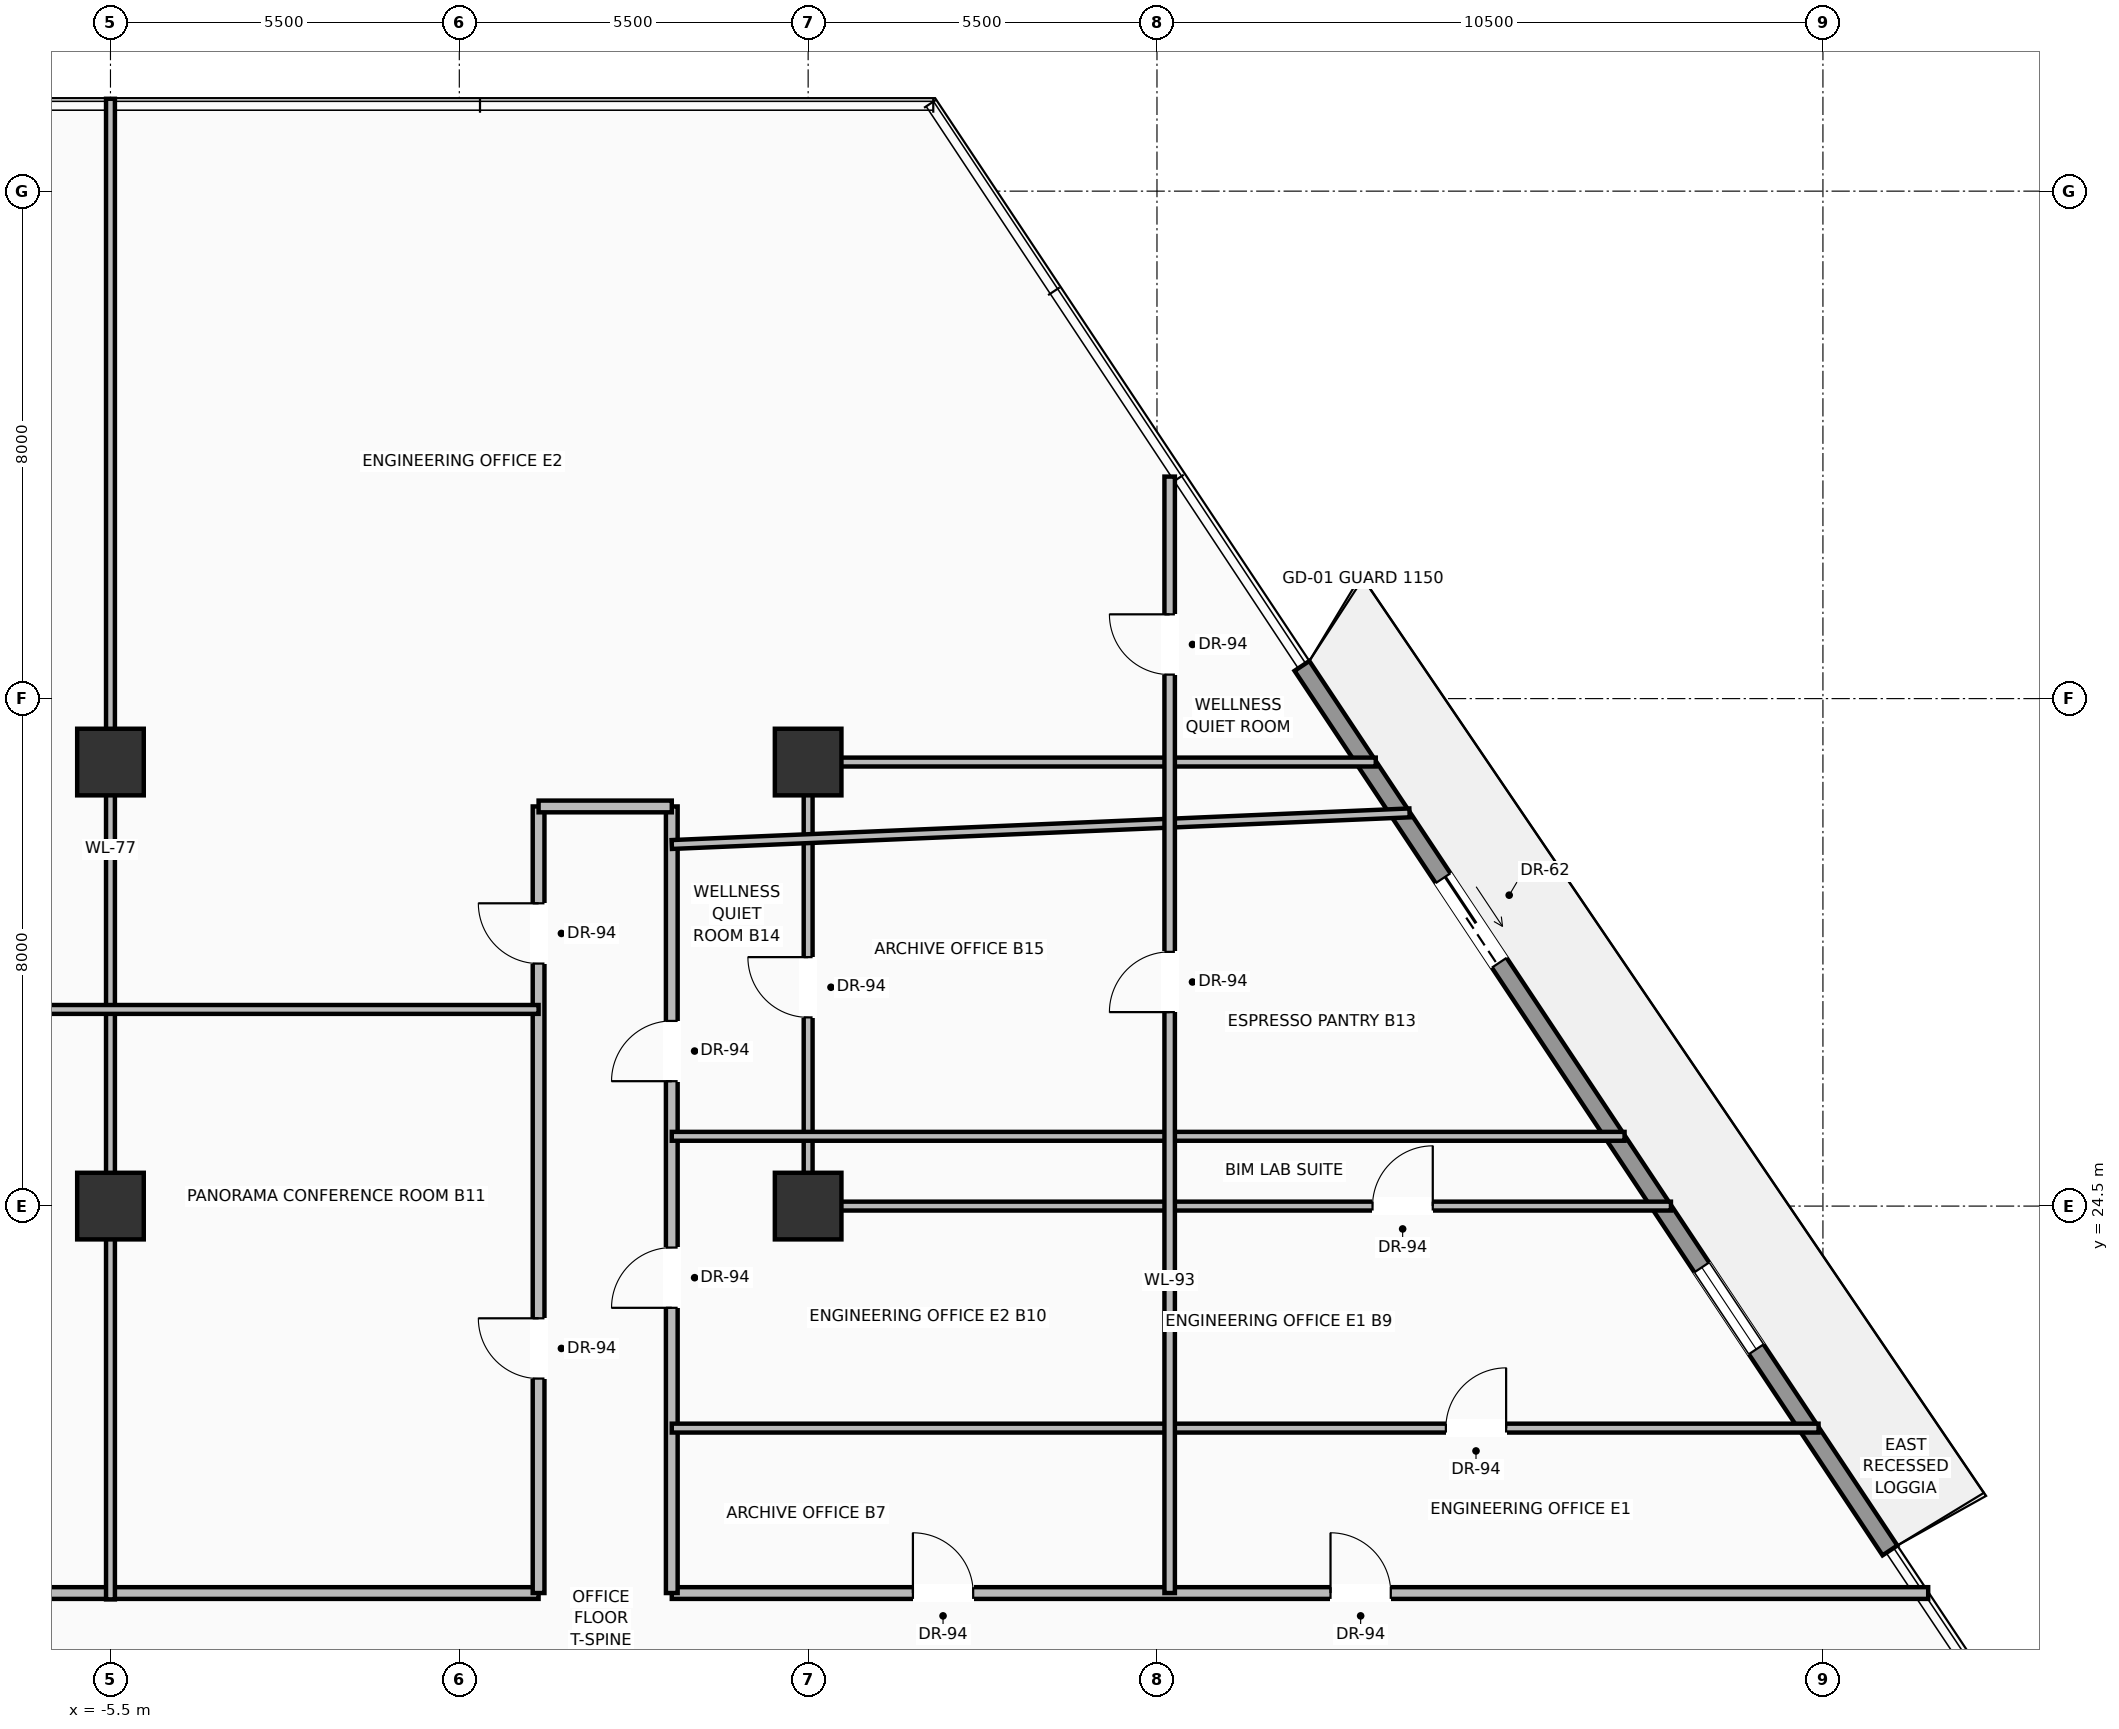
"""IFC4 building model, lengths in metres.
Left out: names, types, materials, properties, quantities, classifications, styles, units other than length and angle.
Written with IfcOpenShell. Run it as: python <this file> out.ifc"""

import sys

from ifc_helpers import new_model, si_unit, direction, frame, frame_2d, origin, origin_2d, place, context, subcontext, project, spatial, rectangle, extrude, source, transform, mapped, element, fill, save


model = new_model("IFC4")
c1 = context("Model", 3, precision=1e-05, world=origin(), true_north=direction((0.0, 1.0)))
c2 = subcontext(c1, "Body", "Model", "MODEL_VIEW")
j1 = project(units=[si_unit("LENGTHUNIT", "METRE"), si_unit("PLANEANGLEUNIT", "RADIAN")], contexts=[c1])
p1 = place(None, origin())
s1 = spatial("IfcSite", under=j1, at=p1, CompositionType="ELEMENT")
p2 = place(p1, origin())
s2 = spatial("IfcBuilding", under=s1, at=p2, CompositionType="ELEMENT")
p3 = place(p2, frame((0.0, 0.0, 57.1)))
s3 = spatial("IfcBuildingStorey", under=s2, at=p3, CompositionType="ELEMENT", Elevation=57.1)
m1 = source(origin(), c2, "Body", "SweptSolid", [
    extrude(rectangle(XDim=1.05, YDim=1.05, at=origin_2d()), origin(), (0.0, 0.0, 1.0), 3.7),
])
for number, where, z_axis, x_axis in (
    (1, (-5.5, 24.5, 0.0), (0.0, 0.0, 1.0), (1.0, 0.0, 0.0)),
    (2, (5.5, 24.5, 0.0), (0.0, 0.0, 1.0), (1.0, 0.0, 0.0)),
    (3, (-5.5, 31.5, 0.0), (0.0, 0.0, 1.0), (1.0, 0.0, 0.0)),
    (4, (5.5, 31.5, 0.0), (0.0, 0.0, 1.0), (1.0, 0.0, 0.0)),
):
    element("IfcColumn", number, at=place(p3, frame(where, z_axis=z_axis, x_axis=x_axis)), inside=s3, PredefinedType="COLUMN", context=c2, shape_type="MappedRepresentation", body=[
        mapped(m1, transform((0.0, 0.0, 0.0), scale=1.0)),
    ])
p4 = place(p3, frame((13.286, 33.015, 0.0), z_axis=(0.0, 0.0, 1.0), x_axis=(0.553666793668, -0.832738303183, 0.0)))
e5 = element("IfcWall", 5, at=p4, inside=s3, PredefinedType="SOLIDWALL", context=c2, shape_type="SweptSolid", body=[
    extrude(rectangle(XDim=16.744, YDim=0.28, at=frame_2d((8.372, 0.0))), origin(), (0.0, 0.0, 1.0), 3.03),
])
p5 = place(p4, frame((4.019, 0.0, 0.0)))
e6 = element("IfcOpeningElement", 6, at=p5, cuts=e5, PredefinedType="OPENING", context=c2, shape_type="SweptSolid", body=[
    extrude(rectangle(XDim=1.6, YDim=2.35, at=frame_2d((0.8, 1.175))), frame((0.0, 0.15, 0.0), z_axis=(0.0, -1.0, 0.0), x_axis=(1.0, 0.0, 0.0)), (0.0, 0.0, 1.0), 0.3),
])
p6 = place(p4, frame((11.386, 0.0, 0.9)))
e7 = element("IfcOpeningElement", 7, at=p6, cuts=e5, PredefinedType="OPENING", context=c2, shape_type="SweptSolid", body=[
    extrude(rectangle(XDim=1.55, YDim=1.85, at=frame_2d((0.775, 0.925))), frame((0.0, 0.15, 0.0), z_axis=(0.0, -1.0, 0.0), x_axis=(1.0, 0.0, 0.0)), (0.0, 0.0, 1.0), 0.3),
])
p7 = place(p3, frame((-22.873, 18.4, 0.0), z_axis=(0.0, 0.0, 1.0), x_axis=(1.0, 0.0, 0.0)))
e8 = element("IfcWall", 8, at=p7, inside=s3, PredefinedType="PARTITIONING", context=c2, shape_type="SweptSolid", body=[
    extrude(rectangle(XDim=24.123, YDim=0.185, at=frame_2d((12.062, 0.0))), origin(), (0.0, 0.0, 1.0), 2.747),
])
p8 = place(p7, frame((10.415, 0.0, 0.0)))
e9 = element("IfcOpeningElement", 9, at=p8, cuts=e8, PredefinedType="OPENING", context=c2, shape_type="SweptSolid", body=[
    extrude(rectangle(XDim=0.95, YDim=2.2, at=frame_2d((0.475, 1.1))), frame((0.0, 0.103, 0.0), z_axis=(0.0, -1.0, 0.0), x_axis=(1.0, 0.0, 0.0)), (0.0, 0.0, 1.0), 0.205),
])
p9 = place(p3, frame((3.35, 18.4, 0.0), z_axis=(0.0, 0.0, 1.0), x_axis=(1.0, 0.0, 0.0)))
e10 = element("IfcWall", 10, at=p9, inside=s3, PredefinedType="PARTITIONING", context=c2, shape_type="SweptSolid", body=[
    extrude(rectangle(XDim=19.809, YDim=0.185, at=frame_2d((9.905, 0.0))), origin(), (0.0, 0.0, 1.0), 2.747),
])
p10 = place(p9, frame((10.386, 0.0, 0.0)))
e11 = element("IfcOpeningElement", 11, at=p10, cuts=e10, PredefinedType="OPENING", context=c2, shape_type="SweptSolid", body=[
    extrude(rectangle(XDim=0.95, YDim=2.2, at=frame_2d((0.475, 1.1))), frame((0.0, 0.103, 0.0), z_axis=(0.0, -1.0, 0.0), x_axis=(1.0, 0.0, 0.0)), (0.0, 0.0, 1.0), 0.205),
])
p11 = place(p9, frame((3.802, 0.0, 0.0)))
e12 = element("IfcOpeningElement", 12, at=p11, cuts=e10, PredefinedType="OPENING", context=c2, shape_type="SweptSolid", body=[
    extrude(rectangle(XDim=0.95, YDim=2.2, at=frame_2d((0.475, 1.1))), frame((0.0, 0.103, 0.0), z_axis=(0.0, -1.0, 0.0), x_axis=(1.0, 0.0, 0.0)), (0.0, 0.0, 1.0), 0.205),
])
p12 = place(p3, frame((1.25, 18.4, 0.0), z_axis=(0.0, 0.0, 1.0), x_axis=(0.0, 1.0, 0.0)))
e13 = element("IfcWall", 13, at=p12, inside=s3, PredefinedType="PARTITIONING", context=c2, shape_type="SweptSolid", body=[
    extrude(rectangle(XDim=12.4, YDim=0.185, at=frame_2d((6.2, 0.0))), origin(), (0.0, 0.0, 1.0), 2.747),
])
p13 = place(p12, frame((3.381, 0.0, 0.0)))
e14 = element("IfcOpeningElement", 14, at=p13, cuts=e13, PredefinedType="OPENING", context=c2, shape_type="SweptSolid", body=[
    extrude(rectangle(XDim=0.95, YDim=2.2, at=frame_2d((0.475, 1.1))), frame((0.0, 0.103, 0.0), z_axis=(0.0, -1.0, 0.0), x_axis=(1.0, 0.0, 0.0)), (0.0, 0.0, 1.0), 0.205),
])
p14 = place(p12, frame((9.923, 0.0, 0.0)))
e15 = element("IfcOpeningElement", 15, at=p14, cuts=e13, PredefinedType="OPENING", context=c2, shape_type="SweptSolid", body=[
    extrude(rectangle(XDim=0.95, YDim=2.2, at=frame_2d((0.475, 1.1))), frame((0.0, 0.103, 0.0), z_axis=(0.0, -1.0, 0.0), x_axis=(1.0, 0.0, 0.0)), (0.0, 0.0, 1.0), 0.205),
])
p15 = place(p3, frame((3.35, 18.4, 0.0), z_axis=(0.0, 0.0, 1.0), x_axis=(0.0, 1.0, 0.0)))
e16 = element("IfcWall", 16, at=p15, inside=s3, PredefinedType="PARTITIONING", context=c2, shape_type="SweptSolid", body=[
    extrude(rectangle(XDim=12.4, YDim=0.185, at=frame_2d((6.2, 0.0))), origin(), (0.0, 0.0, 1.0), 2.747),
])
p16 = place(p15, frame((8.069, 0.0, 0.0)))
e17 = element("IfcOpeningElement", 17, at=p16, cuts=e16, PredefinedType="OPENING", context=c2, shape_type="SweptSolid", body=[
    extrude(rectangle(XDim=0.95, YDim=2.2, at=frame_2d((0.475, 1.1))), frame((0.0, 0.103, 0.0), z_axis=(0.0, -1.0, 0.0), x_axis=(1.0, 0.0, 0.0)), (0.0, 0.0, 1.0), 0.205),
])
p17 = place(p15, frame((4.496, 0.0, 0.0)))
e18 = element("IfcOpeningElement", 18, at=p17, cuts=e16, PredefinedType="OPENING", context=c2, shape_type="SweptSolid", body=[
    extrude(rectangle(XDim=0.95, YDim=2.2, at=frame_2d((0.475, 1.1))), frame((0.0, 0.103, 0.0), z_axis=(0.0, -1.0, 0.0), x_axis=(1.0, 0.0, 0.0)), (0.0, 0.0, 1.0), 0.205),
])
p18 = place(p3, frame((1.25, 30.8, 0.0), z_axis=(0.0, 0.0, 1.0), x_axis=(1.0, 0.0, 0.0)))
e19 = element("IfcWall", 19, at=p18, inside=s3, PredefinedType="PARTITIONING", context=c2, shape_type="SweptSolid", body=[
    extrude(rectangle(XDim=2.1, YDim=0.185, at=frame_2d((1.05, 0.0))), origin(), (0.0, 0.0, 1.0), 3.442),
])
p19 = place(p3, frame((-5.5, 18.3, 0.0), z_axis=(0.0, 0.0, 1.0), x_axis=(0.0, 1.0, 0.0)))
e20 = element("IfcWall", 20, at=p19, inside=s3, PredefinedType="PARTITIONING", context=c2, shape_type="SweptSolid", body=[
    extrude(rectangle(XDim=23.656, YDim=0.14, at=frame_2d((11.828, 0.0))), origin(), (0.0, 0.0, 1.0), 2.747),
])
p20 = place(p3, frame((5.5, 24.5, 0.0), z_axis=(0.0, 0.0, 1.0), x_axis=(1.0, 0.0, 0.0)))
e21 = element("IfcWall", 21, at=p20, inside=s3, PredefinedType="PARTITIONING", context=c2, shape_type="SweptSolid", body=[
    extrude(rectangle(XDim=13.604, YDim=0.14, at=frame_2d((6.802, 0.0))), origin(), (0.0, 0.0, 1.0), 2.747),
])
p21 = place(p20, frame((8.898, 0.0, 0.0)))
e22 = element("IfcOpeningElement", 22, at=p21, cuts=e21, PredefinedType="OPENING", context=c2, shape_type="SweptSolid", body=[
    extrude(rectangle(XDim=0.95, YDim=2.2, at=frame_2d((0.475, 1.1))), frame((0.0, 0.08, 0.0), z_axis=(0.0, -1.0, 0.0), x_axis=(1.0, 0.0, 0.0)), (0.0, 0.0, 1.0), 0.16),
])
p22 = place(p3, frame((5.5, 24.5, 0.0), z_axis=(0.0, 0.0, 1.0), x_axis=(0.0, 1.0, 0.0)))
e23 = element("IfcWall", 23, at=p22, inside=s3, PredefinedType="PARTITIONING", context=c2, shape_type="SweptSolid", body=[
    extrude(rectangle(XDim=7.0, YDim=0.14, at=frame_2d((3.5, 0.0))), origin(), (0.0, 0.0, 1.0), 2.747),
])
p23 = place(p22, frame((2.975, 0.0, 0.0)))
e24 = element("IfcOpeningElement", 24, at=p23, cuts=e23, PredefinedType="OPENING", context=c2, shape_type="SweptSolid", body=[
    extrude(rectangle(XDim=0.95, YDim=2.2, at=frame_2d((0.475, 1.1))), frame((0.0, 0.08, 0.0), z_axis=(0.0, -1.0, 0.0), x_axis=(1.0, 0.0, 0.0)), (0.0, 0.0, 1.0), 0.16),
])
p24 = place(p3, frame((5.5, 31.5, 0.0), z_axis=(0.0, 0.0, 1.0), x_axis=(1.0, 0.0, 0.0)))
e25 = element("IfcWall", 25, at=p24, inside=s3, PredefinedType="PARTITIONING", context=c2, shape_type="SweptSolid", body=[
    extrude(rectangle(XDim=8.949, YDim=0.14, at=frame_2d((4.475, 0.0))), origin(), (0.0, 0.0, 1.0), 2.747),
])
p25 = place(p3, frame((-16.613, 27.6, 0.0), z_axis=(0.0, 0.0, 1.0), x_axis=(1.0, 0.0, 0.0)))
e26 = element("IfcWall", 26, at=p25, inside=s3, PredefinedType="PARTITIONING", context=c2, shape_type="SweptSolid", body=[
    extrude(rectangle(XDim=17.863, YDim=0.14, at=frame_2d((8.932, 0.0))), origin(), (0.0, 0.0, 1.0), 2.747),
])
p26 = place(p25, frame((5.355, 0.0, 0.0)))
e27 = element("IfcOpeningElement", 27, at=p26, cuts=e26, PredefinedType="OPENING", context=c2, shape_type="SweptSolid", body=[
    extrude(rectangle(XDim=0.95, YDim=2.2, at=frame_2d((0.475, 1.1))), frame((0.0, 0.08, 0.0), z_axis=(0.0, -1.0, 0.0), x_axis=(1.0, 0.0, 0.0)), (0.0, 0.0, 1.0), 0.16),
])
p27 = place(p3, frame((3.35, 21.0, 0.0), z_axis=(0.0, 0.0, 1.0), x_axis=(1.0, 0.0, 0.0)))
e28 = element("IfcWall", 28, at=p27, inside=s3, PredefinedType="PARTITIONING", context=c2, shape_type="SweptSolid", body=[
    extrude(rectangle(XDim=18.081, YDim=0.14, at=frame_2d((9.041, 0.0))), origin(), (0.0, 0.0, 1.0), 2.747),
])
p28 = place(p27, frame((12.205, 0.0, 0.0)))
e29 = element("IfcOpeningElement", 29, at=p28, cuts=e28, PredefinedType="OPENING", context=c2, shape_type="SweptSolid", body=[
    extrude(rectangle(XDim=0.95, YDim=2.2, at=frame_2d((0.475, 1.1))), frame((0.0, 0.08, 0.0), z_axis=(0.0, -1.0, 0.0), x_axis=(1.0, 0.0, 0.0)), (0.0, 0.0, 1.0), 0.16),
])
p29 = place(p3, frame((3.35, 25.6, 0.0), z_axis=(0.0, 0.0, 1.0), x_axis=(1.0, 0.0, 0.0)))
e30 = element("IfcWall", 30, at=p29, inside=s3, PredefinedType="PARTITIONING", context=c2, shape_type="SweptSolid", body=[
    extrude(rectangle(XDim=15.022, YDim=0.14, at=frame_2d((7.511, 0.0))), origin(), (0.0, 0.0, 1.0), 2.747),
])
p30 = place(p3, frame((3.35, 30.2, 0.0), z_axis=(0.0, 0.0, 1.0), x_axis=(0.999082870188, 0.042818436404, 0.0)))
e31 = element("IfcWall", 31, at=p30, inside=s3, PredefinedType="PARTITIONING", context=c2, shape_type="SweptSolid", body=[
    extrude(rectangle(XDim=11.643, YDim=0.14, at=frame_2d((5.822, 0.0))), origin(), (0.0, 0.0, 1.0), 2.747),
])
p31 = place(p3, frame((11.2, 18.4, 0.0), z_axis=(0.0, 0.0, 1.0), x_axis=(0.0, 1.0, 0.0)))
e32 = element("IfcWall", 32, at=p31, inside=s3, PredefinedType="PARTITIONING", context=c2, shape_type="SweptSolid", body=[
    extrude(rectangle(XDim=17.6, YDim=0.165, at=frame_2d((8.8, 0.0))), origin(), (0.0, 0.0, 1.0), 2.747),
])
p32 = place(p31, frame((9.158, 0.0, 0.0)))
e33 = element("IfcOpeningElement", 33, at=p32, cuts=e32, PredefinedType="OPENING", context=c2, shape_type="SweptSolid", body=[
    extrude(rectangle(XDim=0.95, YDim=2.2, at=frame_2d((0.475, 1.1))), frame((0.0, 0.093, 0.0), z_axis=(0.0, -1.0, 0.0), x_axis=(1.0, 0.0, 0.0)), (0.0, 0.0, 1.0), 0.185),
])
p33 = place(p31, frame((14.479, 0.0, 0.0)))
e34 = element("IfcOpeningElement", 34, at=p33, cuts=e32, PredefinedType="OPENING", context=c2, shape_type="SweptSolid", body=[
    extrude(rectangle(XDim=0.95, YDim=2.2, at=frame_2d((0.475, 1.1))), frame((0.0, 0.093, 0.0), z_axis=(0.0, -1.0, 0.0), x_axis=(1.0, 0.0, 0.0)), (0.0, 0.0, 1.0), 0.185),
])
m2 = source(origin(), c2, "Body", "SweptSolid", [
    extrude(rectangle(XDim=1.6, YDim=2.35, at=frame_2d((0.8, 1.175))), frame((0.0, 0.025, 0.0), z_axis=(0.0, -1.0, 0.0), x_axis=(1.0, 0.0, 0.0)), (0.0, 0.0, 1.0), 0.05),
])
p34 = place(p5, origin())
e35 = element("IfcDoor", 35, at=p34, inside=s3, OperationType="SLIDING_TO_RIGHT", PredefinedType="DOOR", context=c2, shape_type="MappedRepresentation", body=[
    mapped(m2, transform((0.0, 0.0, 0.0), scale=1.0)),
])
fill(e6, e35)
m3 = source(origin(), c2, "Body", "SweptSolid", [
    extrude(rectangle(XDim=1.55, YDim=1.85, at=frame_2d((0.775, 0.925))), frame((0.0, 0.03, 0.0), z_axis=(0.0, -1.0, 0.0), x_axis=(1.0, 0.0, 0.0)), (0.0, 0.0, 1.0), 0.06),
])
p35 = place(p6, origin())
e36 = element("IfcWindow", 36, at=p35, inside=s3, PartitioningType="SINGLE_PANEL", PredefinedType="WINDOW", context=c2, shape_type="MappedRepresentation", body=[
    mapped(m3, transform((0.0, 0.0, 0.0), scale=1.0)),
])
fill(e7, e36)
m4 = source(origin(), c2, "Body", "SweptSolid", [
    extrude(rectangle(XDim=0.95, YDim=2.2, at=frame_2d((0.475, 1.1))), frame((0.0, 0.025, 0.0), z_axis=(0.0, -1.0, 0.0), x_axis=(1.0, 0.0, 0.0)), (0.0, 0.0, 1.0), 0.05),
])
p36 = place(p10, origin())
e37 = element("IfcDoor", 37, at=p36, inside=s3, OperationType="SINGLE_SWING_LEFT", PredefinedType="DOOR", context=c2, shape_type="MappedRepresentation", body=[
    mapped(m4, transform((0.0, 0.0, 0.0), scale=1.0)),
])
fill(e11, e37)
p37 = place(p13, origin())
e38 = element("IfcDoor", 38, at=p37, inside=s3, OperationType="SINGLE_SWING_RIGHT", PredefinedType="DOOR", context=c2, shape_type="MappedRepresentation", body=[
    mapped(m4, transform((0.0, 0.0, 0.0), scale=1.0)),
])
fill(e14, e38)
p38 = place(p16, origin())
e39 = element("IfcDoor", 39, at=p38, inside=s3, OperationType="SINGLE_SWING_LEFT", PredefinedType="DOOR", context=c2, shape_type="MappedRepresentation", body=[
    mapped(m4, transform((0.0, 0.0, 0.0), scale=1.0)),
])
fill(e17, e39)
p39 = place(p11, origin())
e40 = element("IfcDoor", 40, at=p39, inside=s3, OperationType="SINGLE_SWING_LEFT", PredefinedType="DOOR", context=c2, shape_type="MappedRepresentation", body=[
    mapped(m4, transform((0.0, 0.0, 0.0), scale=1.0)),
])
fill(e12, e40)
p40 = place(p28, origin())
e41 = element("IfcDoor", 41, at=p40, inside=s3, OperationType="SINGLE_SWING_RIGHT", PredefinedType="DOOR", context=c2, shape_type="MappedRepresentation", body=[
    mapped(m4, transform((0.0, 0.0, 0.0), scale=1.0)),
])
fill(e29, e41)
p41 = place(p17, origin())
e42 = element("IfcDoor", 42, at=p41, inside=s3, OperationType="SINGLE_SWING_LEFT", PredefinedType="DOOR", context=c2, shape_type="MappedRepresentation", body=[
    mapped(m4, transform((0.0, 0.0, 0.0), scale=1.0)),
])
fill(e18, e42)
p42 = place(p23, origin())
e43 = element("IfcDoor", 43, at=p42, inside=s3, OperationType="SINGLE_SWING_RIGHT", PredefinedType="DOOR", context=c2, shape_type="MappedRepresentation", body=[
    mapped(m4, transform((0.0, 0.0, 0.0), scale=1.0)),
])
fill(e24, e43)
p43 = place(p14, origin())
e44 = element("IfcDoor", 44, at=p43, inside=s3, OperationType="SINGLE_SWING_RIGHT", PredefinedType="DOOR", context=c2, shape_type="MappedRepresentation", body=[
    mapped(m4, transform((0.0, 0.0, 0.0), scale=1.0)),
])
fill(e15, e44)
p44 = place(p21, origin())
e45 = element("IfcDoor", 45, at=p44, inside=s3, OperationType="SINGLE_SWING_RIGHT", PredefinedType="DOOR", context=c2, shape_type="MappedRepresentation", body=[
    mapped(m4, transform((0.0, 0.0, 0.0), scale=1.0)),
])
fill(e22, e45)
p45 = place(p32, origin())
e46 = element("IfcDoor", 46, at=p45, inside=s3, OperationType="SINGLE_SWING_LEFT", PredefinedType="DOOR", context=c2, shape_type="MappedRepresentation", body=[
    mapped(m4, transform((0.0, 0.0, 0.0), scale=1.0)),
])
fill(e33, e46)
p46 = place(p33, origin())
e47 = element("IfcDoor", 47, at=p46, inside=s3, OperationType="SINGLE_SWING_RIGHT", PredefinedType="DOOR", context=c2, shape_type="MappedRepresentation", body=[
    mapped(m4, transform((0.0, 0.0, 0.0), scale=1.0)),
])
fill(e34, e47)
save(model, sys.argv[1])
